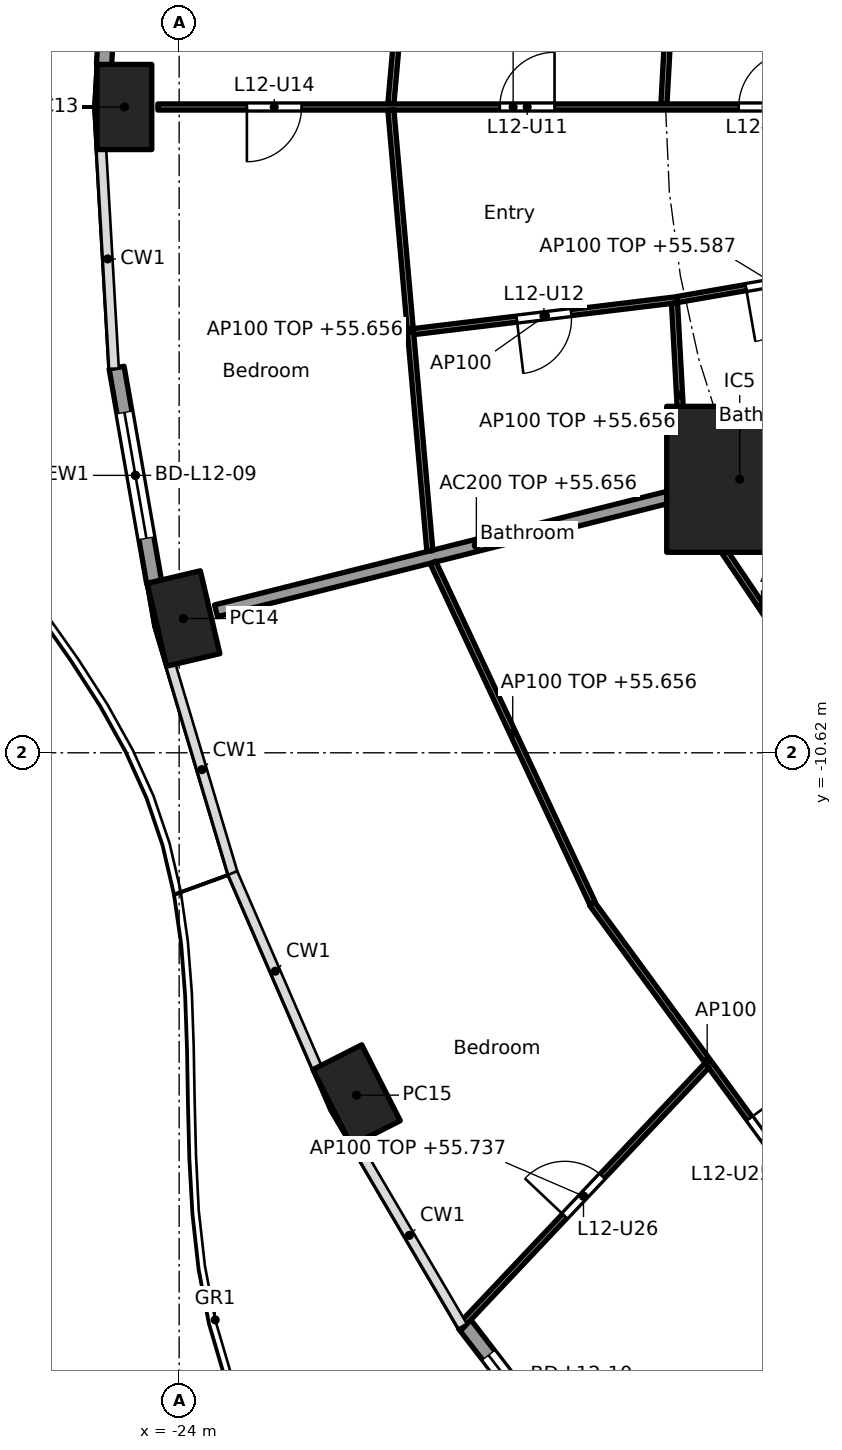
"""IFC4 building model, lengths in metres.
Left out: names, types, materials, properties, quantities, classifications, styles, units other than length and angle.
Written with IfcOpenShell. Run it as: python <this file> out.ifc"""

import sys

from ifc_helpers import new_model, si_unit, direction, frame, frame_2d, origin, origin_2d, place, context, subcontext, project, spatial, rectangle, hollow_rectangle, extrude, element, fill, save


model = new_model("IFC4")
c1 = context("Model", 3, precision=1e-05, world=origin(), true_north=direction((0.0, 1.0)))
c2 = subcontext(c1, "Body", "Model", "MODEL_VIEW")
j1 = project(units=[si_unit("LENGTHUNIT", "METRE"), si_unit("PLANEANGLEUNIT", "RADIAN")], contexts=[c1])
p1 = place(None, origin())
s1 = spatial("IfcSite", under=j1, at=p1, CompositionType="ELEMENT")
p2 = place(p1, origin())
s2 = spatial("IfcBuilding", under=s1, at=p2, CompositionType="ELEMENT")
p3 = place(p2, frame((0.0, 0.0, 52.9)))
s3 = spatial("IfcBuildingStorey", under=s2, at=p3, CompositionType="ELEMENT", Elevation=52.9)
for number, where, z_axis, x_axis in (
    (1, (-24.9, 0.0, 0.0), (0.0, 0.0, 1.0), (0.0, -1.0, 0.0)),
    (2, (-23.929, -8.412, 0.0), (0.0, 0.0, 1.0), (0.229, -0.973, 0.0)),
    (3, (-21.082, -16.25, 0.0), (0.0, 0.0, 1.0), (0.452, -0.892, 0.0)),
):
    element("IfcColumn", number, at=place(p3, frame(where, z_axis=z_axis, x_axis=x_axis)), inside=s3, PredefinedType="COLUMN", context=c2, shape_type="SweptSolid", body=[
        extrude(hollow_rectangle(XDim=1.4, YDim=0.9, WallThickness=0.05, at=origin_2d()), origin(), (0.0, 0.0, 1.0), 3.7),
    ])
p4 = place(p3, frame((-14.782, -6.123, 0.0), z_axis=(0.0, 0.0, 1.0), x_axis=(1.0, 0.0, 0.0)))
e4 = element("IfcColumn", 4, at=p4, inside=s3, PredefinedType="COLUMN", context=c2, shape_type="SweptSolid", body=[
    extrude(rectangle(XDim=2.4, YDim=2.4, at=origin_2d()), origin(), (0.0, 0.0, 1.0), 3.7),
])
p5 = place(p3, frame((-25.235, 0.692, 0.0), z_axis=(0.0, 0.0, 1.0), x_axis=(0.057478727308, 0.998346731305, 0.0)))
e5 = element("IfcWall", 5, at=p5, inside=s3, PredefinedType="SOLIDWALL", context=c2, shape_type="SweptSolid", body=[
    extrude(rectangle(XDim=3.615, YDim=0.25, at=frame_2d((1.807, 0.0))), origin(), (0.0, 0.0, 1.0), 3.44),
])
p6 = place(p5, frame((0.757, 0.0, 0.0)))
e6 = element("IfcOpeningElement", 6, at=p6, cuts=e5, PredefinedType="OPENING", context=c2, shape_type="SweptSolid", body=[
    extrude(rectangle(XDim=2.1, YDim=2.4, at=frame_2d((1.05, 1.2))), frame((0.0, 0.135, 0.0), z_axis=(0.0, -1.0, 0.0), x_axis=(1.0, 0.0, 0.0)), (0.0, 0.0, 1.0), 0.27),
])
p7 = place(p3, frame((-24.409, -7.83, 0.0), z_axis=(0.0, 0.0, 1.0), x_axis=(-0.172217377323, 0.98505897029, 0.0)))
e7 = element("IfcWall", 7, at=p7, inside=s3, PredefinedType="SOLIDWALL", context=c2, shape_type="SweptSolid", body=[
    extrude(rectangle(XDim=3.598, YDim=0.25, at=frame_2d((1.799, 0.0))), origin(), (0.0, 0.0, 1.0), 3.44),
])
p8 = place(p7, frame((0.749, 0.0, 0.0)))
e8 = element("IfcOpeningElement", 8, at=p8, cuts=e7, PredefinedType="OPENING", context=c2, shape_type="SweptSolid", body=[
    extrude(rectangle(XDim=2.1, YDim=2.4, at=frame_2d((1.05, 1.2))), frame((0.0, 0.135, 0.0), z_axis=(0.0, -1.0, 0.0), x_axis=(1.0, 0.0, 0.0)), (0.0, 0.0, 1.0), 0.27),
])
p9 = place(p3, frame((-17.234, -22.704, 0.0), z_axis=(0.0, 0.0, 1.0), x_axis=(-0.610457147657, 0.792049285635, 0.0)))
e9 = element("IfcWall", 9, at=p9, inside=s3, PredefinedType="SOLIDWALL", context=c2, shape_type="SweptSolid", body=[
    extrude(rectangle(XDim=3.397, YDim=0.25, at=frame_2d((1.699, 0.0))), origin(), (0.0, 0.0, 1.0), 3.44),
])
p10 = place(p9, frame((0.649, 0.0, 0.0)))
e10 = element("IfcOpeningElement", 10, at=p10, cuts=e9, PredefinedType="OPENING", context=c2, shape_type="SweptSolid", body=[
    extrude(rectangle(XDim=2.1, YDim=2.4, at=frame_2d((1.05, 1.2))), frame((0.0, 0.135, 0.0), z_axis=(0.0, -1.0, 0.0), x_axis=(1.0, 0.0, 0.0)), (0.0, 0.0, 1.0), 0.27),
])
p11 = place(p3, frame((-12.657, -5.243, 0.0), z_axis=(0.0, 0.0, 1.0), x_axis=(-0.923885664896, -0.382668627144, 0.0)))
e11 = element("IfcWall", 11, at=p11, inside=s3, PredefinedType="PARTITIONING", context=c2, shape_type="SweptSolid", body=[
    extrude(rectangle(XDim=2.2, YDim=0.2, at=frame_2d((1.1, 0.0))), origin(), (0.0, 0.0, 1.0), 3.44),
])
p12 = place(p3, frame((-14.831, -6.135, 0.0), z_axis=(0.0, 0.0, 1.0), x_axis=(-0.969884949569, -0.243563512454, 0.0)))
e12 = element("IfcWall", 12, at=p12, inside=s3, PredefinedType="PARTITIONING", context=c2, shape_type="SweptSolid", body=[
    extrude(rectangle(XDim=8.829, YDim=0.2, at=frame_2d((4.415, 0.0))), origin(), (0.0, 0.0, 1.0), 2.756),
])
p13 = place(p3, frame((-15.688, 6.249, 0.0), z_axis=(0.0, 0.0, 1.0), x_axis=(-0.054659814056, -0.998505034903, 0.0)))
e13 = element("IfcWall", 13, at=p13, inside=s3, PredefinedType="PARTITIONING", context=c2, shape_type="SweptSolid", body=[
    extrude(rectangle(XDim=6.208, YDim=0.1, at=frame_2d((3.104, 0.0))), origin(), (0.0, 0.0, 1.0), 2.756),
])
p14 = place(p3, frame((-19.877, 7.301, 0.0), z_axis=(0.0, 0.0, 1.0), x_axis=(-0.088143415068, -0.996107794558, 0.0)))
e14 = element("IfcWall", 14, at=p14, inside=s3, PredefinedType="PARTITIONING", context=c2, shape_type="SweptSolid", body=[
    extrude(rectangle(XDim=7.279, YDim=0.1, at=frame_2d((3.64, 0.0))), origin(), (0.0, 0.0, 1.0), 2.756),
])
p15 = place(p14, frame((3.189, 0.0, 0.0)))
e15 = element("IfcOpeningElement", 15, at=p15, cuts=e14, PredefinedType="OPENING", context=c2, shape_type="SweptSolid", body=[
    extrude(rectangle(XDim=0.9, YDim=2.1, at=frame_2d((0.45, 1.05))), frame((0.0, 0.06, 0.0), z_axis=(0.0, -1.0, 0.0), x_axis=(1.0, 0.0, 0.0)), (0.0, 0.0, 1.0), 0.12),
])
p16 = place(p3, frame((-12.665, 0.0, 0.0), z_axis=(0.0, 0.0, 1.0), x_axis=(-1.0, 0.0, 0.0)))
e16 = element("IfcWall", 16, at=p16, inside=s3, PredefinedType="PARTITIONING", context=c2, shape_type="SweptSolid", body=[
    extrude(rectangle(XDim=11.685, YDim=0.1, at=frame_2d((5.843, 0.0))), origin(), (0.0, 0.0, 1.0), 2.687),
])
p17 = place(p16, frame((1.233, 0.0, 0.0)))
e17 = element("IfcOpeningElement", 17, at=p17, cuts=e16, PredefinedType="OPENING", context=c2, shape_type="SweptSolid", body=[
    extrude(rectangle(XDim=0.9, YDim=2.1, at=frame_2d((0.45, 1.05))), frame((0.0, 0.06, 0.0), z_axis=(0.0, -1.0, 0.0), x_axis=(1.0, 0.0, 0.0)), (0.0, 0.0, 1.0), 0.12),
])
p18 = place(p16, frame((5.162, 0.0, 0.0)))
e18 = element("IfcOpeningElement", 18, at=p18, cuts=e16, PredefinedType="OPENING", context=c2, shape_type="SweptSolid", body=[
    extrude(rectangle(XDim=0.9, YDim=2.1, at=frame_2d((0.45, 1.05))), frame((0.0, 0.06, 0.0), z_axis=(0.0, -1.0, 0.0), x_axis=(1.0, 0.0, 0.0)), (0.0, 0.0, 1.0), 0.12),
])
p19 = place(p16, frame((9.322, 0.0, 0.0)))
e19 = element("IfcOpeningElement", 19, at=p19, cuts=e16, PredefinedType="OPENING", context=c2, shape_type="SweptSolid", body=[
    extrude(rectangle(XDim=0.9, YDim=2.1, at=frame_2d((0.45, 1.05))), frame((0.0, 0.06, 0.0), z_axis=(0.0, -1.0, 0.0), x_axis=(1.0, 0.0, 0.0)), (0.0, 0.0, 1.0), 0.12),
])
p20 = place(p3, frame((-20.518, -0.05, 0.0), z_axis=(0.0, 0.0, 1.0), x_axis=(0.088143415068, -0.996107794558, 0.0)))
e20 = element("IfcWall", 20, at=p20, inside=s3, PredefinedType="PARTITIONING", context=c2, shape_type="SweptSolid", body=[
    extrude(rectangle(XDim=7.279, YDim=0.1, at=frame_2d((3.64, 0.0))), origin(), (0.0, 0.0, 1.0), 2.756),
])
p21 = place(p3, frame((-12.663, -2.619, 0.0), z_axis=(0.0, 0.0, 1.0), x_axis=(-0.985220176102, -0.171292745325, 0.0)))
e21 = element("IfcWall", 21, at=p21, inside=s3, PredefinedType="PARTITIONING", context=c2, shape_type="SweptSolid", body=[
    extrude(rectangle(XDim=3.191, YDim=0.1, at=frame_2d((1.596, 0.0))), origin(), (0.0, 0.0, 1.0), 2.687),
])
p22 = place(p21, frame((1.146, 0.0, 0.0)))
e22 = element("IfcOpeningElement", 22, at=p22, cuts=e21, PredefinedType="OPENING", context=c2, shape_type="SweptSolid", body=[
    extrude(rectangle(XDim=0.9, YDim=2.1, at=frame_2d((0.45, 1.05))), frame((0.0, 0.06, 0.0), z_axis=(0.0, -1.0, 0.0), x_axis=(1.0, 0.0, 0.0)), (0.0, 0.0, 1.0), 0.12),
])
p23 = place(p3, frame((-15.807, -3.168, 0.0), z_axis=(0.0, 0.0, 1.0), x_axis=(-0.992741666002, -0.120266306938, 0.0)))
e23 = element("IfcWall", 23, at=p23, inside=s3, PredefinedType="PARTITIONING", context=c2, shape_type="SweptSolid", body=[
    extrude(rectangle(XDim=4.371, YDim=0.1, at=frame_2d((2.185, 0.0))), origin(), (0.0, 0.0, 1.0), 3.44),
])
p24 = place(p23, frame((1.76, 0.0, 0.0)))
e24 = element("IfcOpeningElement", 24, at=p24, cuts=e23, PredefinedType="OPENING", context=c2, shape_type="SweptSolid", body=[
    extrude(rectangle(XDim=0.9, YDim=2.1, at=frame_2d((0.45, 1.05))), frame((0.0, 0.06, 0.0), z_axis=(0.0, -1.0, 0.0), x_axis=(1.0, 0.0, 0.0)), (0.0, 0.0, 1.0), 0.12),
])
p25 = place(p3, frame((-15.854, -3.225, 0.0), z_axis=(0.0, 0.0, 1.0), x_axis=(0.054644199943, -0.998505889523, 0.0)))
e25 = element("IfcWall", 25, at=p25, inside=s3, PredefinedType="PARTITIONING", context=c2, shape_type="SweptSolid", body=[
    extrude(rectangle(XDim=3.029, YDim=0.1, at=frame_2d((1.515, 0.0))), origin(), (0.0, 0.0, 1.0), 2.756),
])
p26 = place(p3, frame((-15.627, -6.432, 0.0), z_axis=(0.0, 0.0, 1.0), x_axis=(0.559112679527, -0.829091678641, 0.0)))
e26 = element("IfcWall", 26, at=p26, inside=s3, PredefinedType="PARTITIONING", context=c2, shape_type="SweptSolid", body=[
    extrude(rectangle(XDim=4.308, YDim=0.1, at=frame_2d((2.154, 0.0))), origin(), (0.0, 0.0, 1.0), 3.44),
])
p27 = place(p3, frame((-19.826, -7.491, 0.0), z_axis=(0.0, 0.0, 1.0), x_axis=(0.423926333401, -0.905696673202, 0.0)))
e27 = element("IfcWall", 27, at=p27, inside=s3, PredefinedType="PARTITIONING", context=c2, shape_type="SweptSolid", body=[
    extrude(rectangle(XDim=6.188, YDim=0.1, at=frame_2d((3.094, 0.0))), origin(), (0.0, 0.0, 1.0), 2.756),
])
p28 = place(p3, frame((-17.211, -13.1, 0.0), z_axis=(0.0, 0.0, 1.0), x_axis=(0.591206785834, -0.806520016109, 0.0)))
e28 = element("IfcWall", 28, at=p28, inside=s3, PredefinedType="PARTITIONING", context=c2, shape_type="SweptSolid", body=[
    extrude(rectangle(XDim=6.41, YDim=0.1, at=frame_2d((3.205, 0.0))), origin(), (0.0, 0.0, 1.0), 2.756),
])
p29 = place(p28, frame((4.383, 0.0, 0.0)))
e29 = element("IfcOpeningElement", 29, at=p29, cuts=e28, PredefinedType="OPENING", context=c2, shape_type="SweptSolid", body=[
    extrude(rectangle(XDim=0.9, YDim=2.1, at=frame_2d((0.45, 1.05))), frame((0.0, 0.06, 0.0), z_axis=(0.0, -1.0, 0.0), x_axis=(1.0, 0.0, 0.0)), (0.0, 0.0, 1.0), 0.12),
])
p30 = place(p3, frame((-15.321, -15.761, 0.0), z_axis=(0.0, 0.0, 1.0), x_axis=(-0.686519245775, -0.727111631856, 0.0)))
e30 = element("IfcWall", 30, at=p30, inside=s3, PredefinedType="PARTITIONING", context=c2, shape_type="SweptSolid", body=[
    extrude(rectangle(XDim=5.912, YDim=0.1, at=frame_2d((2.956, 0.0))), origin(), (0.0, 0.0, 1.0), 2.837),
])
p31 = place(p30, frame((2.506, 0.0, 0.0)))
e31 = element("IfcOpeningElement", 31, at=p31, cuts=e30, PredefinedType="OPENING", context=c2, shape_type="SweptSolid", body=[
    extrude(rectangle(XDim=0.9, YDim=2.1, at=frame_2d((0.45, 1.05))), frame((0.0, 0.06, 0.0), z_axis=(0.0, -1.0, 0.0), x_axis=(1.0, 0.0, 0.0)), (0.0, 0.0, 1.0), 0.12),
])
p32 = place(p8, origin())
e32 = element("IfcDoor", 32, at=p32, inside=s3, OperationType="SLIDING_TO_LEFT", PredefinedType="DOOR", context=c2, shape_type="SweptSolid", body=[
    extrude(rectangle(XDim=2.1, YDim=2.4, at=frame_2d((1.05, 1.2))), frame((0.0, 0.025, 0.0), z_axis=(0.0, -1.0, 0.0), x_axis=(1.0, 0.0, 0.0)), (0.0, 0.0, 1.0), 0.05),
])
fill(e8, e32)
p33 = place(p10, origin())
e33 = element("IfcDoor", 33, at=p33, inside=s3, OperationType="SLIDING_TO_LEFT", PredefinedType="DOOR", context=c2, shape_type="SweptSolid", body=[
    extrude(rectangle(XDim=2.1, YDim=2.4, at=frame_2d((1.05, 1.2))), frame((0.0, 0.025, 0.0), z_axis=(0.0, -1.0, 0.0), x_axis=(1.0, 0.0, 0.0)), (0.0, 0.0, 1.0), 0.05),
])
fill(e10, e33)
p34 = place(p17, frame((0.9, 0.0, 0.0), x_axis=(-1.0, 0.0, 0.0)))
e34 = element("IfcDoor", 34, at=p34, inside=s3, OperationType="SINGLE_SWING_RIGHT", PredefinedType="DOOR", context=c2, shape_type="SweptSolid", body=[
    extrude(rectangle(XDim=0.9, YDim=2.1, at=frame_2d((0.45, 1.05))), frame((0.0, 0.025, 0.0), z_axis=(0.0, -1.0, 0.0), x_axis=(1.0, 0.0, 0.0)), (0.0, 0.0, 1.0), 0.05),
])
fill(e17, e34)
p35 = place(p22, origin())
e35 = element("IfcDoor", 35, at=p35, inside=s3, OperationType="SINGLE_SWING_RIGHT", PredefinedType="DOOR", context=c2, shape_type="SweptSolid", body=[
    extrude(rectangle(XDim=0.9, YDim=2.1, at=frame_2d((0.45, 1.05))), frame((0.0, 0.025, 0.0), z_axis=(0.0, -1.0, 0.0), x_axis=(1.0, 0.0, 0.0)), (0.0, 0.0, 1.0), 0.05),
])
fill(e22, e35)
p36 = place(p18, frame((0.9, 0.0, 0.0), x_axis=(-1.0, 0.0, 0.0)))
e36 = element("IfcDoor", 36, at=p36, inside=s3, OperationType="SINGLE_SWING_RIGHT", PredefinedType="DOOR", context=c2, shape_type="SweptSolid", body=[
    extrude(rectangle(XDim=0.9, YDim=2.1, at=frame_2d((0.45, 1.05))), frame((0.0, 0.025, 0.0), z_axis=(0.0, -1.0, 0.0), x_axis=(1.0, 0.0, 0.0)), (0.0, 0.0, 1.0), 0.05),
])
fill(e18, e36)
p37 = place(p24, origin())
e37 = element("IfcDoor", 37, at=p37, inside=s3, OperationType="SINGLE_SWING_RIGHT", PredefinedType="DOOR", context=c2, shape_type="SweptSolid", body=[
    extrude(rectangle(XDim=0.9, YDim=2.1, at=frame_2d((0.45, 1.05))), frame((0.0, 0.025, 0.0), z_axis=(0.0, -1.0, 0.0), x_axis=(1.0, 0.0, 0.0)), (0.0, 0.0, 1.0), 0.05),
])
fill(e24, e37)
p38 = place(p19, origin())
e38 = element("IfcDoor", 38, at=p38, inside=s3, OperationType="SINGLE_SWING_RIGHT", PredefinedType="DOOR", context=c2, shape_type="SweptSolid", body=[
    extrude(rectangle(XDim=0.9, YDim=2.1, at=frame_2d((0.45, 1.05))), frame((0.0, 0.025, 0.0), z_axis=(0.0, -1.0, 0.0), x_axis=(1.0, 0.0, 0.0)), (0.0, 0.0, 1.0), 0.05),
])
fill(e19, e38)
p39 = place(p29, origin())
e39 = element("IfcDoor", 39, at=p39, inside=s3, OperationType="SINGLE_SWING_LEFT", PredefinedType="DOOR", context=c2, shape_type="SweptSolid", body=[
    extrude(rectangle(XDim=0.9, YDim=2.1, at=frame_2d((0.45, 1.05))), frame((0.0, 0.025, 0.0), z_axis=(0.0, -1.0, 0.0), x_axis=(1.0, 0.0, 0.0)), (0.0, 0.0, 1.0), 0.05),
])
fill(e29, e39)
p40 = place(p31, frame((0.9, 0.0, 0.0), x_axis=(-1.0, 0.0, 0.0)))
e40 = element("IfcDoor", 40, at=p40, inside=s3, OperationType="SINGLE_SWING_LEFT", PredefinedType="DOOR", context=c2, shape_type="SweptSolid", body=[
    extrude(rectangle(XDim=0.9, YDim=2.1, at=frame_2d((0.45, 1.05))), frame((0.0, 0.025, 0.0), z_axis=(0.0, -1.0, 0.0), x_axis=(1.0, 0.0, 0.0)), (0.0, 0.0, 1.0), 0.05),
])
fill(e31, e40)
save(model, sys.argv[1])
